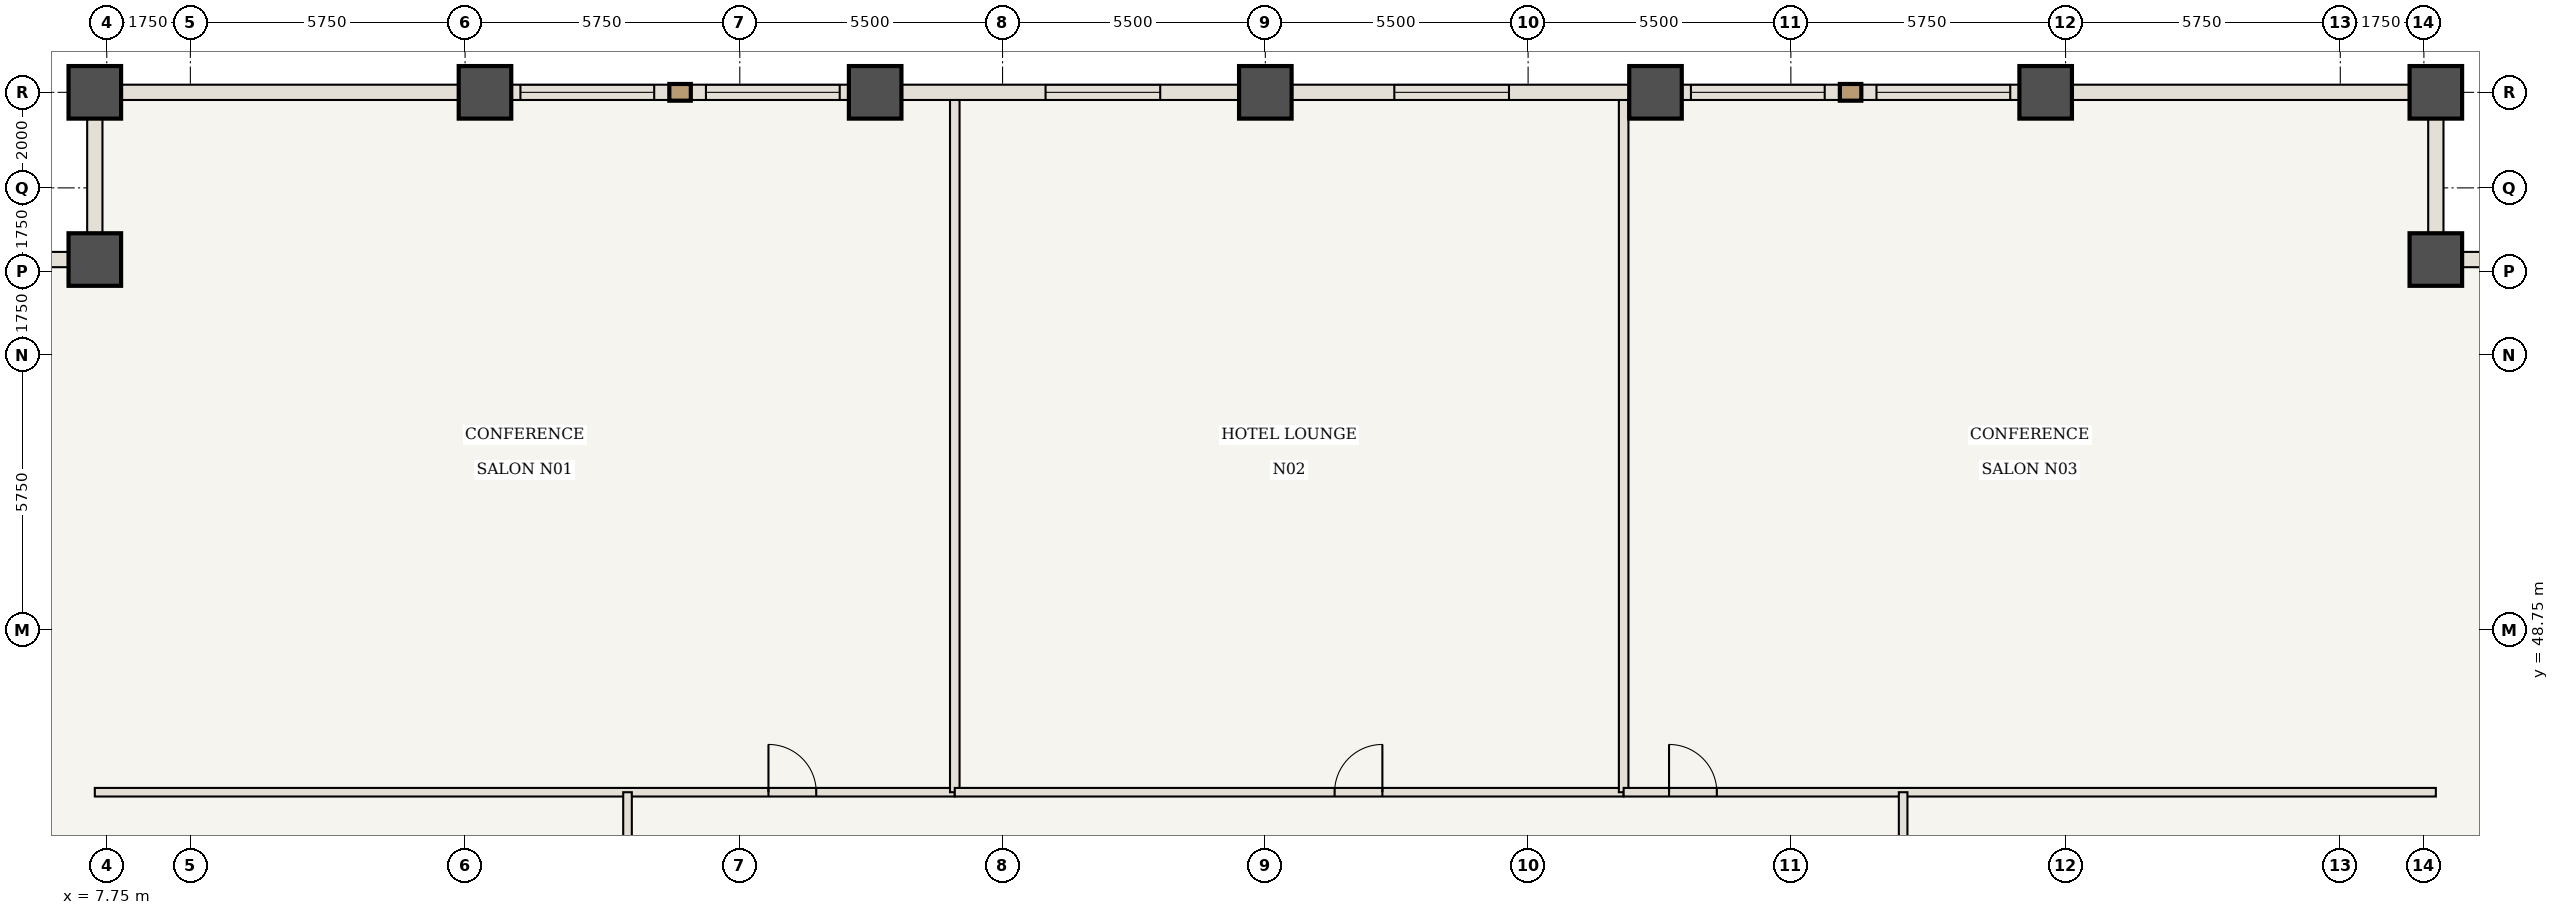
"""IFC4 building model, lengths in metres.
Left out: names, types, materials, properties, quantities, classifications, styles, units other than length and angle.
Written with IfcOpenShell. Run it as: python <this file> out.ifc"""

import sys

from ifc_helpers import new_model, si_unit, direction, frame, frame_2d, origin, origin_2d, place, context, subcontext, project, spatial, rectangle, extrude, element, fill, save


model = new_model("IFC4")
c1 = context("Model", 3, precision=1e-05, world=origin(), true_north=direction((0.0, 1.0)))
c2 = subcontext(c1, "Body", "Model", "MODEL_VIEW")
j1 = project(units=[si_unit("LENGTHUNIT", "METRE"), si_unit("PLANEANGLEUNIT", "RADIAN")], contexts=[c1])
p1 = place(None, origin())
s1 = spatial("IfcSite", under=j1, at=p1, CompositionType="ELEMENT")
p2 = place(p1, origin())
s2 = spatial("IfcBuilding", under=s1, at=p2, CompositionType="ELEMENT")
p3 = place(p2, frame((0.0, 0.0, 59.85)))
s3 = spatial("IfcBuildingStorey", under=s2, at=p3, CompositionType="ELEMENT", Elevation=59.85)
for number, where, z_axis, x_axis in (
    (1, (56.5, 56.5, 0.0), (0.0, 0.0, 1.0), (1.0, 0.0, 0.0)),
    (2, (56.5, 60.0, 0.0), (0.0, 0.0, 1.0), (1.0, 0.0, 0.0)),
    (3, (7.5, 60.0, 0.0), (0.0, 0.0, 1.0), (1.0, 0.0, 0.0)),
    (4, (7.5, 56.5, 0.0), (0.0, 0.0, 1.0), (1.0, 0.0, 0.0)),
    (5, (15.667, 60.0, 0.0), (0.0, 0.0, 1.0), (1.0, 0.0, 0.0)),
    (6, (23.833, 60.0, 0.0), (0.0, 0.0, 1.0), (1.0, 0.0, 0.0)),
    (7, (32.0, 60.0, 0.0), (0.0, 0.0, 1.0), (1.0, 0.0, 0.0)),
    (8, (40.167, 60.0, 0.0), (0.0, 0.0, 1.0), (1.0, 0.0, 0.0)),
    (9, (48.333, 60.0, 0.0), (0.0, 0.0, 1.0), (1.0, 0.0, 0.0)),
):
    element("IfcColumn", number, at=place(p3, frame(where, z_axis=z_axis, x_axis=x_axis)), inside=s3, PredefinedType="COLUMN", context=c2, shape_type="SweptSolid", body=[
        extrude(rectangle(XDim=1.1, YDim=1.1, at=origin_2d()), origin(), (0.0, 0.0, 1.0), 3.5),
    ])
p4 = place(p3, frame((7.5, 45.35, 0.0), z_axis=(0.0, 0.0, 1.0), x_axis=(1.0, 0.0, 0.0)))
e10 = element("IfcWall", 10, at=p4, inside=s3, PredefinedType="STANDARD", context=c2, shape_type="SweptSolid", body=[
    extrude(rectangle(XDim=18.0, YDim=0.18, at=frame_2d((9.0, 0.0))), origin(), (0.0, 0.0, 1.0), 3.32),
])
p5 = place(p4, frame((14.1, 0.0, 0.0)))
e11 = element("IfcOpeningElement", 11, at=p5, cuts=e10, PredefinedType="OPENING", context=c2, shape_type="SweptSolid", body=[
    extrude(rectangle(XDim=1.0, YDim=2.15, at=frame_2d((0.5, 1.075))), frame((0.0, 0.1, 0.0), z_axis=(0.0, -1.0, 0.0), x_axis=(1.0, 0.0, 0.0)), (0.0, 0.0, 1.0), 0.2),
])
p6 = place(p3, frame((25.5, 45.35, 0.0), z_axis=(0.0, 0.0, 1.0), x_axis=(0.0, 1.0, 0.0)))
e12 = element("IfcWall", 12, at=p6, inside=s3, PredefinedType="STANDARD", context=c2, shape_type="SweptSolid", body=[
    extrude(rectangle(XDim=14.59, YDim=0.2, at=frame_2d((7.295, 0.0))), origin(), (0.0, 0.0, 1.0), 3.32),
])
p7 = place(p3, frame((25.5, 45.35, 0.0), z_axis=(0.0, 0.0, 1.0), x_axis=(1.0, 0.0, 0.0)))
e13 = element("IfcWall", 13, at=p7, inside=s3, PredefinedType="STANDARD", context=c2, shape_type="SweptSolid", body=[
    extrude(rectangle(XDim=14.0, YDim=0.18, at=frame_2d((7.0, 0.0))), origin(), (0.0, 0.0, 1.0), 3.32),
])
p8 = place(p7, frame((7.95, 0.0, 0.0)))
e14 = element("IfcOpeningElement", 14, at=p8, cuts=e13, PredefinedType="OPENING", context=c2, shape_type="SweptSolid", body=[
    extrude(rectangle(XDim=1.0, YDim=2.15, at=frame_2d((0.5, 1.075))), frame((0.0, 0.1, 0.0), z_axis=(0.0, -1.0, 0.0), x_axis=(1.0, 0.0, 0.0)), (0.0, 0.0, 1.0), 0.2),
])
p9 = place(p3, frame((39.5, 45.35, 0.0), z_axis=(0.0, 0.0, 1.0), x_axis=(0.0, 1.0, 0.0)))
e15 = element("IfcWall", 15, at=p9, inside=s3, PredefinedType="STANDARD", context=c2, shape_type="SweptSolid", body=[
    extrude(rectangle(XDim=14.59, YDim=0.2, at=frame_2d((7.295, 0.0))), origin(), (0.0, 0.0, 1.0), 3.32),
])
p10 = place(p3, frame((39.5, 45.35, 0.0), z_axis=(0.0, 0.0, 1.0), x_axis=(1.0, 0.0, 0.0)))
e16 = element("IfcWall", 16, at=p10, inside=s3, PredefinedType="STANDARD", context=c2, shape_type="SweptSolid", body=[
    extrude(rectangle(XDim=17.0, YDim=0.18, at=frame_2d((8.5, 0.0))), origin(), (0.0, 0.0, 1.0), 3.32),
])
p11 = place(p10, frame((0.95, 0.0, 0.0)))
e17 = element("IfcOpeningElement", 17, at=p11, cuts=e16, PredefinedType="OPENING", context=c2, shape_type="SweptSolid", body=[
    extrude(rectangle(XDim=1.0, YDim=2.15, at=frame_2d((0.5, 1.075))), frame((0.0, 0.1, 0.0), z_axis=(0.0, -1.0, 0.0), x_axis=(1.0, 0.0, 0.0)), (0.0, 0.0, 1.0), 0.2),
])
p12 = place(p3, frame((18.65, 41.5, 0.0), z_axis=(0.0, 0.0, 1.0), x_axis=(0.0, 1.0, 0.0)))
e18 = element("IfcWall", 18, at=p12, inside=s3, PredefinedType="STANDARD", context=c2, shape_type="SweptSolid", body=[
    extrude(rectangle(XDim=3.85, YDim=0.18, at=frame_2d((1.925, 0.0))), origin(), (0.0, 0.0, 1.0), 3.32),
])
p13 = place(p12, frame((1.425, 0.0, 0.0)))
e19 = element("IfcOpeningElement", 19, at=p13, cuts=e18, PredefinedType="OPENING", context=c2, shape_type="SweptSolid", body=[
    extrude(rectangle(XDim=1.0, YDim=2.15, at=frame_2d((0.5, 1.075))), frame((0.0, 0.1, 0.0), z_axis=(0.0, -1.0, 0.0), x_axis=(1.0, 0.0, 0.0)), (0.0, 0.0, 1.0), 0.2),
])
p14 = place(p3, frame((45.35, 39.0, 0.0), z_axis=(0.0, 0.0, 1.0), x_axis=(0.0, 1.0, 0.0)))
e20 = element("IfcWall", 20, at=p14, inside=s3, PredefinedType="STANDARD", context=c2, shape_type="SweptSolid", body=[
    extrude(rectangle(XDim=6.35, YDim=0.18, at=frame_2d((3.175, 0.0))), origin(), (0.0, 0.0, 1.0), 3.32),
])
p15 = place(p14, frame((2.675, 0.0, 0.0)))
e21 = element("IfcOpeningElement", 21, at=p15, cuts=e20, PredefinedType="OPENING", context=c2, shape_type="SweptSolid", body=[
    extrude(rectangle(XDim=1.0, YDim=2.15, at=frame_2d((0.5, 1.075))), frame((0.0, 0.1, 0.0), z_axis=(0.0, -1.0, 0.0), x_axis=(1.0, 0.0, 0.0)), (0.0, 0.0, 1.0), 0.2),
])
p16 = place(p3, frame((7.5, 60.0, 0.0), z_axis=(0.0, 0.0, 1.0), x_axis=(1.0, 0.0, 0.0)))
e22 = element("IfcWall", 22, at=p16, inside=s3, PredefinedType="USERDEFINED", context=c2, shape_type="SweptSolid", body=[
    extrude(rectangle(XDim=8.167, YDim=0.32, at=frame_2d((4.083, 0.0))), origin(), (0.0, 0.0, 1.0), 2.52),
])
p17 = place(p3, frame((15.667, 60.0, 0.0), z_axis=(0.0, 0.0, 1.0), x_axis=(1.0, 0.0, 0.0)))
e23 = element("IfcWall", 23, at=p17, inside=s3, PredefinedType="USERDEFINED", context=c2, shape_type="SweptSolid", body=[
    extrude(rectangle(XDim=8.167, YDim=0.32, at=frame_2d((4.083, 0.0))), origin(), (0.0, 0.0, 1.0), 2.52),
])
p18 = place(p17, frame((0.742, 0.0, 0.85)))
e24 = element("IfcOpeningElement", 24, at=p18, cuts=e23, PredefinedType="OPENING", context=c2, shape_type="SweptSolid", body=[
    extrude(rectangle(XDim=2.8, YDim=1.47, at=frame_2d((1.4, 0.735))), frame((0.0, 0.17, 0.0), z_axis=(0.0, -1.0, 0.0), x_axis=(1.0, 0.0, 0.0)), (0.0, 0.0, 1.0), 0.34),
])
p19 = place(p17, frame((4.625, 0.0, 0.85)))
e25 = element("IfcOpeningElement", 25, at=p19, cuts=e23, PredefinedType="OPENING", context=c2, shape_type="SweptSolid", body=[
    extrude(rectangle(XDim=2.8, YDim=1.47, at=frame_2d((1.4, 0.735))), frame((0.0, 0.17, 0.0), z_axis=(0.0, -1.0, 0.0), x_axis=(1.0, 0.0, 0.0)), (0.0, 0.0, 1.0), 0.34),
])
p20 = place(p3, frame((23.833, 60.0, 0.0), z_axis=(0.0, 0.0, 1.0), x_axis=(1.0, 0.0, 0.0)))
e26 = element("IfcWall", 26, at=p20, inside=s3, PredefinedType="USERDEFINED", context=c2, shape_type="SweptSolid", body=[
    extrude(rectangle(XDim=8.167, YDim=0.32, at=frame_2d((4.083, 0.0))), origin(), (0.0, 0.0, 1.0), 2.52),
])
p21 = place(p20, frame((3.567, 0.0, 0.85)))
e27 = element("IfcOpeningElement", 27, at=p21, cuts=e26, PredefinedType="OPENING", context=c2, shape_type="SweptSolid", body=[
    extrude(rectangle(XDim=2.4, YDim=1.47, at=frame_2d((1.2, 0.735))), frame((0.0, 0.17, 0.0), z_axis=(0.0, -1.0, 0.0), x_axis=(1.0, 0.0, 0.0)), (0.0, 0.0, 1.0), 0.34),
])
p22 = place(p3, frame((32.0, 60.0, 0.0), z_axis=(0.0, 0.0, 1.0), x_axis=(1.0, 0.0, 0.0)))
e28 = element("IfcWall", 28, at=p22, inside=s3, PredefinedType="USERDEFINED", context=c2, shape_type="SweptSolid", body=[
    extrude(rectangle(XDim=8.167, YDim=0.32, at=frame_2d((4.083, 0.0))), origin(), (0.0, 0.0, 1.0), 2.52),
])
p23 = place(p22, frame((2.7, 0.0, 0.85)))
e29 = element("IfcOpeningElement", 29, at=p23, cuts=e28, PredefinedType="OPENING", context=c2, shape_type="SweptSolid", body=[
    extrude(rectangle(XDim=2.4, YDim=1.47, at=frame_2d((1.2, 0.735))), frame((0.0, 0.17, 0.0), z_axis=(0.0, -1.0, 0.0), x_axis=(1.0, 0.0, 0.0)), (0.0, 0.0, 1.0), 0.34),
])
p24 = place(p3, frame((40.167, 60.0, 0.0), z_axis=(0.0, 0.0, 1.0), x_axis=(1.0, 0.0, 0.0)))
e30 = element("IfcWall", 30, at=p24, inside=s3, PredefinedType="USERDEFINED", context=c2, shape_type="SweptSolid", body=[
    extrude(rectangle(XDim=8.167, YDim=0.32, at=frame_2d((4.083, 0.0))), origin(), (0.0, 0.0, 1.0), 2.52),
])
p25 = place(p24, frame((0.742, 0.0, 0.85)))
e31 = element("IfcOpeningElement", 31, at=p25, cuts=e30, PredefinedType="OPENING", context=c2, shape_type="SweptSolid", body=[
    extrude(rectangle(XDim=2.8, YDim=1.47, at=frame_2d((1.4, 0.735))), frame((0.0, 0.17, 0.0), z_axis=(0.0, -1.0, 0.0), x_axis=(1.0, 0.0, 0.0)), (0.0, 0.0, 1.0), 0.34),
])
p26 = place(p24, frame((4.625, 0.0, 0.85)))
e32 = element("IfcOpeningElement", 32, at=p26, cuts=e30, PredefinedType="OPENING", context=c2, shape_type="SweptSolid", body=[
    extrude(rectangle(XDim=2.8, YDim=1.47, at=frame_2d((1.4, 0.735))), frame((0.0, 0.17, 0.0), z_axis=(0.0, -1.0, 0.0), x_axis=(1.0, 0.0, 0.0)), (0.0, 0.0, 1.0), 0.34),
])
p27 = place(p3, frame((48.333, 60.0, 0.0), z_axis=(0.0, 0.0, 1.0), x_axis=(1.0, 0.0, 0.0)))
e33 = element("IfcWall", 33, at=p27, inside=s3, PredefinedType="USERDEFINED", context=c2, shape_type="SweptSolid", body=[
    extrude(rectangle(XDim=8.167, YDim=0.32, at=frame_2d((4.083, 0.0))), origin(), (0.0, 0.0, 1.0), 2.52),
])
for number, where, z_axis, x_axis in (
    (34, (56.5, 56.5, 0.0), (0.0, 0.0, 1.0), (1.0, 0.0, 0.0)),
    (35, (56.5, 60.0, 0.0), (0.0, 0.0, 1.0), (0.0, -1.0, 0.0)),
    (36, (7.5, 56.5, 0.0), (0.0, 0.0, 1.0), (0.0, 1.0, 0.0)),
    (37, (4.0, 56.5, 0.0), (0.0, 0.0, 1.0), (1.0, 0.0, 0.0)),
):
    element("IfcWall", number, at=place(p3, frame(where, z_axis=z_axis, x_axis=x_axis)), inside=s3, PredefinedType="USERDEFINED", context=c2, shape_type="SweptSolid", body=[
        extrude(rectangle(XDim=3.5, YDim=0.32, at=frame_2d((1.75, 0.0))), origin(), (0.0, 0.0, 1.0), 2.52),
    ])
p28 = place(p5, origin())
e38 = element("IfcDoor", 38, at=p28, inside=s3, OperationType="SINGLE_SWING_LEFT", PredefinedType="DOOR", context=c2, shape_type="SweptSolid", body=[
    extrude(rectangle(XDim=1.0, YDim=2.15, at=frame_2d((0.5, 1.075))), frame((0.0, 0.025, 0.0), z_axis=(0.0, -1.0, 0.0), x_axis=(1.0, 0.0, 0.0)), (0.0, 0.0, 1.0), 0.05),
])
fill(e11, e38)
p29 = place(p8, origin())
e39 = element("IfcDoor", 39, at=p29, inside=s3, OperationType="SINGLE_SWING_RIGHT", PredefinedType="DOOR", context=c2, shape_type="SweptSolid", body=[
    extrude(rectangle(XDim=1.0, YDim=2.15, at=frame_2d((0.5, 1.075))), frame((0.0, 0.025, 0.0), z_axis=(0.0, -1.0, 0.0), x_axis=(1.0, 0.0, 0.0)), (0.0, 0.0, 1.0), 0.05),
])
fill(e14, e39)
p30 = place(p11, origin())
e40 = element("IfcDoor", 40, at=p30, inside=s3, OperationType="SINGLE_SWING_LEFT", PredefinedType="DOOR", context=c2, shape_type="SweptSolid", body=[
    extrude(rectangle(XDim=1.0, YDim=2.15, at=frame_2d((0.5, 1.075))), frame((0.0, 0.025, 0.0), z_axis=(0.0, -1.0, 0.0), x_axis=(1.0, 0.0, 0.0)), (0.0, 0.0, 1.0), 0.05),
])
fill(e17, e40)
p31 = place(p18, origin())
e41 = element("IfcWindow", 41, at=p31, inside=s3, PartitioningType="SINGLE_PANEL", PredefinedType="WINDOW", context=c2, shape_type="SweptSolid", body=[
    extrude(rectangle(XDim=2.8, YDim=1.47, at=frame_2d((1.4, 0.735))), frame((0.0, 0.03, 0.0), z_axis=(0.0, -1.0, 0.0), x_axis=(1.0, 0.0, 0.0)), (0.0, 0.0, 1.0), 0.06),
])
fill(e24, e41)
p32 = place(p19, origin())
e42 = element("IfcWindow", 42, at=p32, inside=s3, PartitioningType="SINGLE_PANEL", PredefinedType="WINDOW", context=c2, shape_type="SweptSolid", body=[
    extrude(rectangle(XDim=2.8, YDim=1.47, at=frame_2d((1.4, 0.735))), frame((0.0, 0.03, 0.0), z_axis=(0.0, -1.0, 0.0), x_axis=(1.0, 0.0, 0.0)), (0.0, 0.0, 1.0), 0.06),
])
fill(e25, e42)
p33 = place(p21, origin())
e43 = element("IfcWindow", 43, at=p33, inside=s3, PartitioningType="SINGLE_PANEL", PredefinedType="WINDOW", context=c2, shape_type="SweptSolid", body=[
    extrude(rectangle(XDim=2.4, YDim=1.47, at=frame_2d((1.2, 0.735))), frame((0.0, 0.03, 0.0), z_axis=(0.0, -1.0, 0.0), x_axis=(1.0, 0.0, 0.0)), (0.0, 0.0, 1.0), 0.06),
])
fill(e27, e43)
p34 = place(p23, origin())
e44 = element("IfcWindow", 44, at=p34, inside=s3, PartitioningType="SINGLE_PANEL", PredefinedType="WINDOW", context=c2, shape_type="SweptSolid", body=[
    extrude(rectangle(XDim=2.4, YDim=1.47, at=frame_2d((1.2, 0.735))), frame((0.0, 0.03, 0.0), z_axis=(0.0, -1.0, 0.0), x_axis=(1.0, 0.0, 0.0)), (0.0, 0.0, 1.0), 0.06),
])
fill(e29, e44)
p35 = place(p25, origin())
e45 = element("IfcWindow", 45, at=p35, inside=s3, PartitioningType="SINGLE_PANEL", PredefinedType="WINDOW", context=c2, shape_type="SweptSolid", body=[
    extrude(rectangle(XDim=2.8, YDim=1.47, at=frame_2d((1.4, 0.735))), frame((0.0, 0.03, 0.0), z_axis=(0.0, -1.0, 0.0), x_axis=(1.0, 0.0, 0.0)), (0.0, 0.0, 1.0), 0.06),
])
fill(e31, e45)
p36 = place(p26, origin())
e46 = element("IfcWindow", 46, at=p36, inside=s3, PartitioningType="SINGLE_PANEL", PredefinedType="WINDOW", context=c2, shape_type="SweptSolid", body=[
    extrude(rectangle(XDim=2.8, YDim=1.47, at=frame_2d((1.4, 0.735))), frame((0.0, 0.03, 0.0), z_axis=(0.0, -1.0, 0.0), x_axis=(1.0, 0.0, 0.0)), (0.0, 0.0, 1.0), 0.06),
])
fill(e32, e46)
save(model, sys.argv[1])
